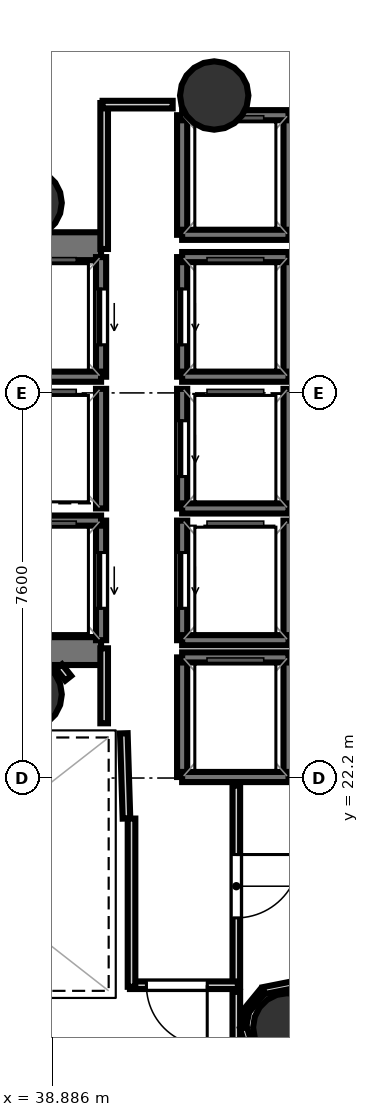
"""IFC4 building model, lengths in metres.
Left out: names, types, materials, properties, quantities, classifications, styles, units other than length and angle.
Written with IfcOpenShell. Run it as: python <this file> out.ifc"""

import sys

from ifc_helpers import new_model, si_unit, direction, frame, frame_2d, origin, origin_2d, place, context, subcontext, project, spatial, rectangle, hollow_circle, extrude, element, fill, save


model = new_model("IFC4")
c1 = context("Model", 3, precision=1e-05, world=origin(), true_north=direction((0.0, 1.0)))
c2 = subcontext(c1, "Body", "Model", "MODEL_VIEW")
j1 = project(units=[si_unit("LENGTHUNIT", "METRE"), si_unit("PLANEANGLEUNIT", "RADIAN")], contexts=[c1])
p1 = place(None, origin())
s1 = spatial("IfcSite", under=j1, at=p1, CompositionType="ELEMENT")
p2 = place(p1, origin())
s2 = spatial("IfcBuilding", under=s1, at=p2, CompositionType="ELEMENT")
p3 = place(p2, frame((0.0, 0.0, 177.2)))
s3 = spatial("IfcBuildingStorey", under=s2, at=p3, CompositionType="ELEMENT", Elevation=177.2)
p4 = place(p3, frame((29.23, 32.695, 0.0), z_axis=(0.0, 0.0, 1.0), x_axis=(1.0, 0.0, 0.0)))
e1 = element("IfcWall", 1, at=p4, inside=s3, PredefinedType="SHEAR", context=c2, shape_type="SweptSolid", body=[
    extrude(rectangle(XDim=10.62, YDim=0.55, at=frame_2d((5.31, 0.0))), origin(), (0.0, 0.0, 1.0), 3.52),
])
p5 = place(p4, frame((0.995, 0.0, 0.0)))
e2 = element("IfcOpeningElement", 2, at=p5, cuts=e1, PredefinedType="OPENING", context=c2, shape_type="SweptSolid", body=[
    extrude(rectangle(XDim=1.25, YDim=2.15, at=frame_2d((0.625, 1.075))), frame((0.0, 0.285, 0.0), z_axis=(0.0, -1.0, 0.0), x_axis=(1.0, 0.0, 0.0)), (0.0, 0.0, 1.0), 0.57),
])
p6 = place(p3, frame((29.23, 24.705, 0.0), z_axis=(0.0, 0.0, 1.0), x_axis=(1.0, 0.0, 0.0)))
e3 = element("IfcWall", 3, at=p6, inside=s3, PredefinedType="SHEAR", context=c2, shape_type="SweptSolid", body=[
    extrude(rectangle(XDim=10.62, YDim=0.55, at=frame_2d((5.31, 0.0))), origin(), (0.0, 0.0, 1.0), 3.52),
])
p7 = place(p6, frame((0.795, 0.0, 0.0)))
e4 = element("IfcOpeningElement", 4, at=p7, cuts=e3, PredefinedType="OPENING", context=c2, shape_type="SweptSolid", body=[
    extrude(rectangle(XDim=1.25, YDim=2.15, at=frame_2d((0.625, 1.075))), frame((0.0, 0.285, 0.0), z_axis=(0.0, -1.0, 0.0), x_axis=(1.0, 0.0, 0.0)), (0.0, 0.0, 1.0), 0.57),
])
for number, where, z_axis, x_axis in (
    (5, (38.4, 33.55, 0.0), (0.0, 0.0, 1.0), (1.0, 0.0, 0.0)),
    (6, (38.4, 23.85, 0.0), (0.0, 0.0, 1.0), (1.0, 0.0, 0.0)),
    (7, (42.083, 35.669, 0.0), (0.0, 0.0, 1.0), (1.0, 0.0, 0.0)),
    (8, (43.525, 17.279, 0.0), (0.0, 0.0, 1.0), (1.0, 0.0, 0.0)),
):
    element("IfcColumn", number, at=place(p3, frame(where, z_axis=z_axis, x_axis=x_axis)), inside=s3, PredefinedType="COLUMN", context=c2, shape_type="SweptSolid", body=[
        extrude(hollow_circle(Radius=0.675, WallThickness=0.032, at=origin_2d()), origin(), (0.0, 0.0, 1.0), 3.7),
    ])
p8 = place(p3, frame((39.85, 30.12, 0.0), z_axis=(0.0, 0.0, 1.0), x_axis=(0.0, 1.0, 0.0)))
e9 = element("IfcWall", 9, at=p8, inside=s3, PredefinedType="SOLIDWALL", context=c2, shape_type="SweptSolid", body=[
    extrude(rectangle(XDim=2.36, YDim=0.2, at=frame_2d((1.18, 0.0))), origin(), (0.0, 0.0, 1.0), 3.52),
])
p9 = place(p8, frame((0.63, 0.0, 0.0)))
e10 = element("IfcOpeningElement", 10, at=p9, cuts=e9, PredefinedType="OPENING", context=c2, shape_type="SweptSolid", body=[
    extrude(rectangle(XDim=1.1, YDim=2.15, at=frame_2d((0.55, 1.075))), frame((0.0, 0.11, 0.0), z_axis=(0.0, -1.0, 0.0), x_axis=(1.0, 0.0, 0.0)), (0.0, 0.0, 1.0), 0.22),
])
p10 = place(p3, frame((37.75, 30.12, 0.0), z_axis=(0.0, 0.0, 1.0), x_axis=(1.0, 0.0, 0.0)))
e11 = element("IfcWall", 11, at=p10, inside=s3, PredefinedType="SOLIDWALL", context=c2, shape_type="SweptSolid", body=[
    extrude(rectangle(XDim=2.1, YDim=0.2, at=frame_2d((1.05, 0.0))), origin(), (0.0, 0.0, 1.0), 3.52),
])
p11 = place(p3, frame((39.85, 24.92, 0.0), z_axis=(0.0, 0.0, 1.0), x_axis=(0.0, 1.0, 0.0)))
e12 = element("IfcWall", 12, at=p11, inside=s3, PredefinedType="SOLIDWALL", context=c2, shape_type="SweptSolid", body=[
    extrude(rectangle(XDim=2.36, YDim=0.2, at=frame_2d((1.18, 0.0))), origin(), (0.0, 0.0, 1.0), 3.52),
])
p12 = place(p11, frame((0.63, 0.0, 0.0)))
e13 = element("IfcOpeningElement", 13, at=p12, cuts=e12, PredefinedType="OPENING", context=c2, shape_type="SweptSolid", body=[
    extrude(rectangle(XDim=1.1, YDim=2.15, at=frame_2d((0.55, 1.075))), frame((0.0, 0.11, 0.0), z_axis=(0.0, -1.0, 0.0), x_axis=(1.0, 0.0, 0.0)), (0.0, 0.0, 1.0), 0.22),
])
p13 = place(p3, frame((37.75, 27.28, 0.0), z_axis=(0.0, 0.0, 1.0), x_axis=(1.0, 0.0, 0.0)))
e14 = element("IfcWall", 14, at=p13, inside=s3, PredefinedType="SOLIDWALL", context=c2, shape_type="SweptSolid", body=[
    extrude(rectangle(XDim=2.1, YDim=0.2, at=frame_2d((1.05, 0.0))), origin(), (0.0, 0.0, 1.0), 3.52),
])
p14 = place(p3, frame((43.55, 30.12, 0.0), z_axis=(0.0, 0.0, 1.0), x_axis=(0.0, 1.0, 0.0)))
e15 = element("IfcWall", 15, at=p14, inside=s3, PredefinedType="SOLIDWALL", context=c2, shape_type="SweptSolid", body=[
    extrude(rectangle(XDim=2.36, YDim=0.2, at=frame_2d((1.18, 0.0))), origin(), (0.0, 0.0, 1.0), 3.52),
])
p15 = place(p3, frame((41.45, 30.12, 0.0), z_axis=(0.0, 0.0, 1.0), x_axis=(0.0, 1.0, 0.0)))
e16 = element("IfcWall", 16, at=p15, inside=s3, PredefinedType="SOLIDWALL", context=c2, shape_type="SweptSolid", body=[
    extrude(rectangle(XDim=2.36, YDim=0.2, at=frame_2d((1.18, 0.0))), origin(), (0.0, 0.0, 1.0), 3.52),
])
p16 = place(p15, frame((0.63, 0.0, 0.0)))
e17 = element("IfcOpeningElement", 17, at=p16, cuts=e16, PredefinedType="OPENING", context=c2, shape_type="SweptSolid", body=[
    extrude(rectangle(XDim=1.1, YDim=2.15, at=frame_2d((0.55, 1.075))), frame((0.0, 0.11, 0.0), z_axis=(0.0, -1.0, 0.0), x_axis=(1.0, 0.0, 0.0)), (0.0, 0.0, 1.0), 0.22),
])
for number, where, z_axis, x_axis in (
    (18, (41.45, 32.48, 0.0), (0.0, 0.0, 1.0), (1.0, 0.0, 0.0)),
    (19, (41.45, 30.12, 0.0), (0.0, 0.0, 1.0), (1.0, 0.0, 0.0)),
):
    element("IfcWall", number, at=place(p3, frame(where, z_axis=z_axis, x_axis=x_axis)), inside=s3, PredefinedType="SOLIDWALL", context=c2, shape_type="SweptSolid", body=[
        extrude(rectangle(XDim=2.1, YDim=0.2, at=frame_2d((1.05, 0.0))), origin(), (0.0, 0.0, 1.0), 3.52),
    ])
p17 = place(p3, frame((43.55, 27.52, 0.0), z_axis=(0.0, 0.0, 1.0), x_axis=(0.0, 1.0, 0.0)))
e20 = element("IfcWall", 20, at=p17, inside=s3, PredefinedType="SOLIDWALL", context=c2, shape_type="SweptSolid", body=[
    extrude(rectangle(XDim=2.36, YDim=0.2, at=frame_2d((1.18, 0.0))), origin(), (0.0, 0.0, 1.0), 3.52),
])
p18 = place(p3, frame((41.45, 27.52, 0.0), z_axis=(0.0, 0.0, 1.0), x_axis=(0.0, 1.0, 0.0)))
e21 = element("IfcWall", 21, at=p18, inside=s3, PredefinedType="SOLIDWALL", context=c2, shape_type="SweptSolid", body=[
    extrude(rectangle(XDim=2.36, YDim=0.2, at=frame_2d((1.18, 0.0))), origin(), (0.0, 0.0, 1.0), 3.52),
])
p19 = place(p18, frame((0.63, 0.0, 0.0)))
e22 = element("IfcOpeningElement", 22, at=p19, cuts=e21, PredefinedType="OPENING", context=c2, shape_type="SweptSolid", body=[
    extrude(rectangle(XDim=1.1, YDim=2.15, at=frame_2d((0.55, 1.075))), frame((0.0, 0.11, 0.0), z_axis=(0.0, -1.0, 0.0), x_axis=(1.0, 0.0, 0.0)), (0.0, 0.0, 1.0), 0.22),
])
p20 = place(p3, frame((41.45, 27.52, 0.0), z_axis=(0.0, 0.0, 1.0), x_axis=(1.0, 0.0, 0.0)))
e23 = element("IfcWall", 23, at=p20, inside=s3, PredefinedType="SOLIDWALL", context=c2, shape_type="SweptSolid", body=[
    extrude(rectangle(XDim=2.1, YDim=0.2, at=frame_2d((1.05, 0.0))), origin(), (0.0, 0.0, 1.0), 3.52),
])
p21 = place(p3, frame((43.55, 24.92, 0.0), z_axis=(0.0, 0.0, 1.0), x_axis=(0.0, 1.0, 0.0)))
e24 = element("IfcWall", 24, at=p21, inside=s3, PredefinedType="SOLIDWALL", context=c2, shape_type="SweptSolid", body=[
    extrude(rectangle(XDim=2.36, YDim=0.2, at=frame_2d((1.18, 0.0))), origin(), (0.0, 0.0, 1.0), 3.52),
])
p22 = place(p3, frame((41.45, 24.92, 0.0), z_axis=(0.0, 0.0, 1.0), x_axis=(0.0, 1.0, 0.0)))
e25 = element("IfcWall", 25, at=p22, inside=s3, PredefinedType="SOLIDWALL", context=c2, shape_type="SweptSolid", body=[
    extrude(rectangle(XDim=2.36, YDim=0.2, at=frame_2d((1.18, 0.0))), origin(), (0.0, 0.0, 1.0), 3.52),
])
p23 = place(p22, frame((0.63, 0.0, 0.0)))
e26 = element("IfcOpeningElement", 26, at=p23, cuts=e25, PredefinedType="OPENING", context=c2, shape_type="SweptSolid", body=[
    extrude(rectangle(XDim=1.1, YDim=2.15, at=frame_2d((0.55, 1.075))), frame((0.0, 0.11, 0.0), z_axis=(0.0, -1.0, 0.0), x_axis=(1.0, 0.0, 0.0)), (0.0, 0.0, 1.0), 0.22),
])
p24 = place(p3, frame((41.45, 24.92, 0.0), z_axis=(0.0, 0.0, 1.0), x_axis=(1.0, 0.0, 0.0)))
e27 = element("IfcWall", 27, at=p24, inside=s3, PredefinedType="SOLIDWALL", context=c2, shape_type="SweptSolid", body=[
    extrude(rectangle(XDim=2.1, YDim=0.2, at=frame_2d((1.05, 0.0))), origin(), (0.0, 0.0, 1.0), 3.52),
])
p25 = place(p3, frame((39.85, 27.52, 0.0), z_axis=(0.0, 0.0, 1.0), x_axis=(0.0, 1.0, 0.0)))
e28 = element("IfcWall", 28, at=p25, inside=s3, PredefinedType="SOLIDWALL", context=c2, shape_type="SweptSolid", body=[
    extrude(rectangle(XDim=2.36, YDim=0.2, at=frame_2d((1.18, 0.0))), origin(), (0.0, 0.0, 1.0), 3.52),
])
for number, where, z_axis, x_axis in (
    (29, (43.55, 22.22, 0.0), (0.0, 0.0, 1.0), (0.0, 1.0, 0.0)),
    (30, (41.45, 22.22, 0.0), (0.0, 0.0, 1.0), (0.0, 1.0, 0.0)),
):
    element("IfcWall", number, at=place(p3, frame(where, z_axis=z_axis, x_axis=x_axis)), inside=s3, PredefinedType="SOLIDWALL", context=c2, shape_type="SweptSolid", body=[
        extrude(rectangle(XDim=2.36, YDim=0.2, at=frame_2d((1.18, 0.0))), origin(), (0.0, 0.0, 1.0), 3.52),
    ])
for number, where, z_axis, x_axis in (
    (31, (41.45, 24.58, 0.0), (0.0, 0.0, 1.0), (1.0, 0.0, 0.0)),
    (32, (41.45, 22.22, 0.0), (0.0, 0.0, 1.0), (1.0, 0.0, 0.0)),
):
    element("IfcWall", number, at=place(p3, frame(where, z_axis=z_axis, x_axis=x_axis)), inside=s3, PredefinedType="SOLIDWALL", context=c2, shape_type="SweptSolid", body=[
        extrude(rectangle(XDim=2.1, YDim=0.2, at=frame_2d((1.05, 0.0))), origin(), (0.0, 0.0, 1.0), 3.52),
    ])
for number, where, z_axis, x_axis in (
    (33, (43.55, 32.92, 0.0), (0.0, 0.0, 1.0), (0.0, 1.0, 0.0)),
    (34, (41.45, 32.92, 0.0), (0.0, 0.0, 1.0), (0.0, 1.0, 0.0)),
):
    element("IfcWall", number, at=place(p3, frame(where, z_axis=z_axis, x_axis=x_axis)), inside=s3, PredefinedType="SOLIDWALL", context=c2, shape_type="SweptSolid", body=[
        extrude(rectangle(XDim=2.36, YDim=0.2, at=frame_2d((1.18, 0.0))), origin(), (0.0, 0.0, 1.0), 3.52),
    ])
for number, where, z_axis, x_axis in (
    (35, (41.45, 35.28, 0.0), (0.0, 0.0, 1.0), (1.0, 0.0, 0.0)),
    (36, (41.45, 32.92, 0.0), (0.0, 0.0, 1.0), (1.0, 0.0, 0.0)),
):
    element("IfcWall", number, at=place(p3, frame(where, z_axis=z_axis, x_axis=x_axis)), inside=s3, PredefinedType="SOLIDWALL", context=c2, shape_type="SweptSolid", body=[
        extrude(rectangle(XDim=2.1, YDim=0.2, at=frame_2d((1.05, 0.0))), origin(), (0.0, 0.0, 1.0), 3.52),
    ])
p26 = place(p3, frame((40.351, 21.401, 0.0), z_axis=(0.0, 0.0, 1.0), x_axis=(-0.031058045979, 0.999517582527, 0.0)))
e37 = element("IfcWall", 37, at=p26, inside=s3, PredefinedType="PARTITIONING", context=c2, shape_type="SweptSolid", body=[
    extrude(rectangle(XDim=1.682, YDim=0.15, at=frame_2d((0.841, 0.0))), origin(), (0.0, 0.0, 1.0), 2.84),
])
p27 = place(p3, frame((39.911, 23.28, 0.0), z_axis=(0.0, 0.0, 1.0), x_axis=(0.0, 1.0, 0.0)))
e38 = element("IfcWall", 38, at=p27, inside=s3, PredefinedType="PARTITIONING", context=c2, shape_type="SweptSolid", body=[
    extrude(rectangle(XDim=1.48, YDim=0.15, at=frame_2d((0.74, 0.0))), origin(), (0.0, 0.0, 1.0), 2.84),
])
p28 = place(p3, frame((39.911, 32.64, 0.0), z_axis=(0.0, 0.0, 1.0), x_axis=(0.0, 1.0, 0.0)))
e39 = element("IfcWall", 39, at=p28, inside=s3, PredefinedType="PARTITIONING", context=c2, shape_type="SweptSolid", body=[
    extrude(rectangle(XDim=2.88, YDim=0.15, at=frame_2d((1.44, 0.0))), origin(), (0.0, 0.0, 1.0), 2.84),
])
p29 = place(p3, frame((39.88, 35.489, 0.0), z_axis=(0.0, 0.0, 1.0), x_axis=(1.0, 0.0, 0.0)))
e40 = element("IfcWall", 40, at=p29, inside=s3, PredefinedType="PARTITIONING", context=c2, shape_type="SweptSolid", body=[
    extrude(rectangle(XDim=1.383, YDim=0.15, at=frame_2d((0.691, 0.0))), origin(), (0.0, 0.0, 1.0), 2.84),
])
p30 = place(p3, frame((42.519, 22.05, 0.0), z_axis=(0.0, 0.0, 1.0), x_axis=(0.0, -1.0, 0.0)))
e41 = element("IfcWall", 41, at=p30, inside=s3, PredefinedType="PARTITIONING", context=c2, shape_type="SweptSolid", body=[
    extrude(rectangle(XDim=3.97, YDim=0.15, at=frame_2d((1.985, 0.0))), origin(), (0.0, 0.0, 1.0), 2.84),
])
p31 = place(p30, frame((1.36, 0.0, 0.0)))
e42 = element("IfcOpeningElement", 42, at=p31, cuts=e41, PredefinedType="OPENING", context=c2, shape_type="SweptSolid", body=[
    extrude(rectangle(XDim=1.25, YDim=2.2, at=frame_2d((0.625, 1.1))), frame((0.0, 0.085, 0.0), z_axis=(0.0, -1.0, 0.0), x_axis=(1.0, 0.0, 0.0)), (0.0, 0.0, 1.0), 0.17),
])
p32 = place(p3, frame((42.55, 18.111, 0.0), z_axis=(0.0, 0.0, 1.0), x_axis=(-1.0, 0.0, 0.0)))
e43 = element("IfcWall", 43, at=p32, inside=s3, PredefinedType="PARTITIONING", context=c2, shape_type="SweptSolid", body=[
    extrude(rectangle(XDim=2.13, YDim=0.15, at=frame_2d((1.065, 0.0))), origin(), (0.0, 0.0, 1.0), 2.84),
])
p33 = place(p32, frame((0.605, 0.0, 0.0)))
e44 = element("IfcOpeningElement", 44, at=p33, cuts=e43, PredefinedType="OPENING", context=c2, shape_type="SweptSolid", body=[
    extrude(rectangle(XDim=1.2, YDim=2.15, at=frame_2d((0.6, 1.075))), frame((0.0, 0.085, 0.0), z_axis=(0.0, -1.0, 0.0), x_axis=(1.0, 0.0, 0.0)), (0.0, 0.0, 1.0), 0.17),
])
p34 = place(p3, frame((40.451, 18.08, 0.0), z_axis=(0.0, 0.0, 1.0), x_axis=(0.0, 1.0, 0.0)))
e45 = element("IfcWall", 45, at=p34, inside=s3, PredefinedType="PARTITIONING", context=c2, shape_type="SweptSolid", body=[
    extrude(rectangle(XDim=3.32, YDim=0.15, at=frame_2d((1.66, 0.0))), origin(), (0.0, 0.0, 1.0), 2.84),
])
p35 = place(p3, frame((39.202, 24.169, 0.0), z_axis=(0.0, 0.0, 1.0), x_axis=(-0.622453876994, 0.782656483405, 0.0)))
e46 = element("IfcWall", 46, at=p35, inside=s3, PredefinedType="PARTITIONING", context=c2, shape_type="SweptSolid", body=[
    extrude(rectangle(XDim=0.292, YDim=0.15, at=frame_2d((0.146, 0.0))), origin(), (0.0, 0.0, 1.0), 2.84),
])
p36 = place(p3, frame((42.519, 17.98, 0.0), z_axis=(0.0, 0.0, 1.0), x_axis=(0.0, -1.0, 0.0)))
e47 = element("IfcWall", 47, at=p36, inside=s3, PredefinedType="PARTITIONING", context=c2, shape_type="SweptSolid", body=[
    extrude(rectangle(XDim=3.02, YDim=0.15, at=frame_2d((1.51, 0.0))), origin(), (0.0, 0.0, 1.0), 2.84),
])
p37 = place(p3, frame((43.682, 18.128, 0.0), z_axis=(0.0, 0.0, 1.0), x_axis=(-0.98075661624, -0.195234371211, 0.0)))
e48 = element("IfcWall", 48, at=p37, inside=s3, PredefinedType="PARTITIONING", context=c2, shape_type="SweptSolid", body=[
    extrude(rectangle(XDim=0.639, YDim=0.14, at=frame_2d((0.319, 0.0))), origin(), (0.0, 0.0, 1.0), 2.84),
])
p38 = place(p3, frame((43.037, 17.993, 0.0), z_axis=(0.0, 0.0, 1.0), x_axis=(-0.634470928201, -0.772946726022, 0.0)))
e49 = element("IfcWall", 49, at=p38, inside=s3, PredefinedType="PARTITIONING", context=c2, shape_type="SweptSolid", body=[
    extrude(rectangle(XDim=0.485, YDim=0.12, at=frame_2d((0.242, 0.0))), origin(), (0.0, 0.0, 1.0), 2.84),
])
p39 = place(p3, frame((42.723, 17.604, 0.0), z_axis=(0.0, 0.0, 1.0), x_axis=(-0.194819090972, -0.980839192627, 0.0)))
e50 = element("IfcWall", 50, at=p39, inside=s3, PredefinedType="PARTITIONING", context=c2, shape_type="SweptSolid", body=[
    extrude(rectangle(XDim=0.326, YDim=0.105, at=frame_2d((0.163, 0.0))), origin(), (0.0, 0.0, 1.0), 2.84),
])
p40 = place(p3, frame((42.66, 17.27, 0.0), z_axis=(0.0, 0.0, 1.0), x_axis=(0.29011922788, -0.956990508633, 0.0)))
e51 = element("IfcWall", 51, at=p40, inside=s3, PredefinedType="PARTITIONING", context=c2, shape_type="SweptSolid", body=[
    extrude(rectangle(XDim=0.485, YDim=0.14, at=frame_2d((0.242, 0.0))), origin(), (0.0, 0.0, 1.0), 2.84),
])
p41 = place(p9, origin())
e52 = element("IfcDoor", 52, at=p41, inside=s3, OperationType="SLIDING_TO_LEFT", PredefinedType="DOOR", context=c2, shape_type="SweptSolid", body=[
    extrude(rectangle(XDim=1.1, YDim=2.15, at=frame_2d((0.55, 1.075))), frame((0.0, 0.025, 0.0), z_axis=(0.0, -1.0, 0.0), x_axis=(1.0, 0.0, 0.0)), (0.0, 0.0, 1.0), 0.05),
])
fill(e10, e52)
p42 = place(p12, origin())
e53 = element("IfcDoor", 53, at=p42, inside=s3, OperationType="SLIDING_TO_LEFT", PredefinedType="DOOR", context=c2, shape_type="SweptSolid", body=[
    extrude(rectangle(XDim=1.1, YDim=2.15, at=frame_2d((0.55, 1.075))), frame((0.0, 0.025, 0.0), z_axis=(0.0, -1.0, 0.0), x_axis=(1.0, 0.0, 0.0)), (0.0, 0.0, 1.0), 0.05),
])
fill(e13, e53)
p43 = place(p16, origin())
e54 = element("IfcDoor", 54, at=p43, inside=s3, OperationType="SLIDING_TO_LEFT", PredefinedType="DOOR", context=c2, shape_type="SweptSolid", body=[
    extrude(rectangle(XDim=1.1, YDim=2.15, at=frame_2d((0.55, 1.075))), frame((0.0, 0.025, 0.0), z_axis=(0.0, -1.0, 0.0), x_axis=(1.0, 0.0, 0.0)), (0.0, 0.0, 1.0), 0.05),
])
fill(e17, e54)
p44 = place(p19, origin())
e55 = element("IfcDoor", 55, at=p44, inside=s3, OperationType="SLIDING_TO_LEFT", PredefinedType="DOOR", context=c2, shape_type="SweptSolid", body=[
    extrude(rectangle(XDim=1.1, YDim=2.15, at=frame_2d((0.55, 1.075))), frame((0.0, 0.025, 0.0), z_axis=(0.0, -1.0, 0.0), x_axis=(1.0, 0.0, 0.0)), (0.0, 0.0, 1.0), 0.05),
])
fill(e22, e55)
p45 = place(p23, origin())
e56 = element("IfcDoor", 56, at=p45, inside=s3, OperationType="SLIDING_TO_LEFT", PredefinedType="DOOR", context=c2, shape_type="SweptSolid", body=[
    extrude(rectangle(XDim=1.1, YDim=2.15, at=frame_2d((0.55, 1.075))), frame((0.0, 0.025, 0.0), z_axis=(0.0, -1.0, 0.0), x_axis=(1.0, 0.0, 0.0)), (0.0, 0.0, 1.0), 0.05),
])
fill(e26, e56)
p46 = place(p33, origin())
e57 = element("IfcDoor", 57, at=p46, inside=s3, OperationType="SINGLE_SWING_LEFT", PredefinedType="DOOR", context=c2, shape_type="SweptSolid", body=[
    extrude(rectangle(XDim=1.2, YDim=2.15, at=frame_2d((0.6, 1.075))), frame((0.0, 0.025, 0.0), z_axis=(0.0, -1.0, 0.0), x_axis=(1.0, 0.0, 0.0)), (0.0, 0.0, 1.0), 0.05),
])
fill(e44, e57)
p47 = place(p31, origin())
e58 = element("IfcDoor", 58, at=p47, inside=s3, OperationType="SINGLE_SWING_LEFT", PredefinedType="DOOR", context=c2, shape_type="SweptSolid", body=[
    extrude(rectangle(XDim=1.25, YDim=2.2, at=frame_2d((0.625, 1.1))), frame((0.0, 0.025, 0.0), z_axis=(0.0, -1.0, 0.0), x_axis=(1.0, 0.0, 0.0)), (0.0, 0.0, 1.0), 0.05),
])
fill(e42, e58)
save(model, sys.argv[1])
